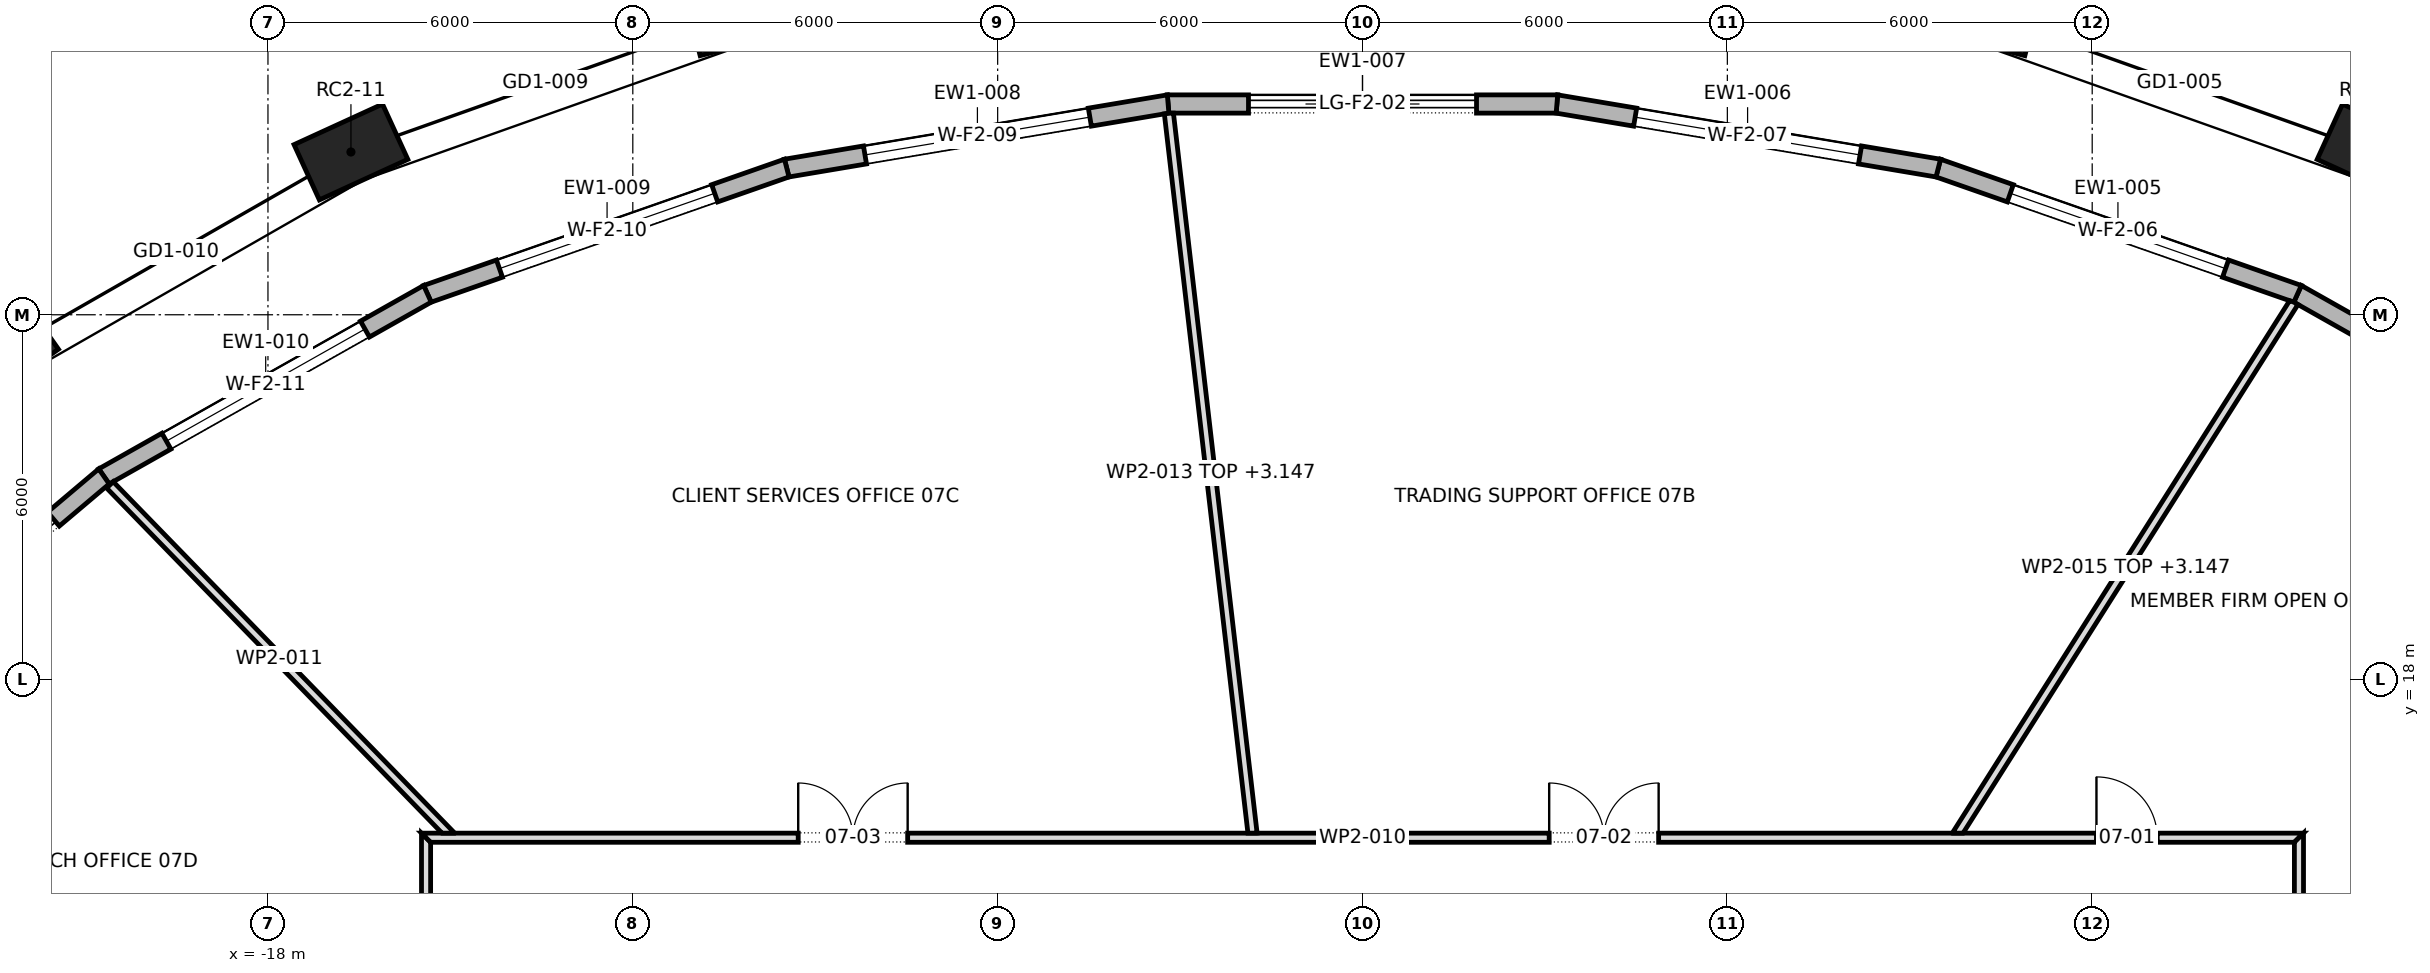
"""IFC4 building model, lengths in metres.
Left out: names, types, materials, properties, quantities, classifications, styles, units other than length and angle.
Written with IfcOpenShell. Run it as: python <this file> out.ifc"""

import sys

from ifc_helpers import new_model, si_unit, direction, frame, frame_2d, origin, origin_2d, place, context, subcontext, project, spatial, polyline, rectangle, outline, extrude, element, fill, save


model = new_model("IFC4")
c1 = context("Model", 3, precision=1e-05, world=origin(), true_north=direction((0.0, 1.0)))
c2 = subcontext(c1, "Body", "Model", "MODEL_VIEW")
j1 = project(units=[si_unit("LENGTHUNIT", "METRE"), si_unit("PLANEANGLEUNIT", "RADIAN")], contexts=[c1])
p1 = place(None, origin())
s1 = spatial("IfcSite", under=j1, at=p1, CompositionType="ELEMENT")
p2 = place(p1, origin())
s2 = spatial("IfcBuilding", under=s1, at=p2, CompositionType="ELEMENT")
p3 = place(p2, frame((0.0, 0.0, 104.5)))
s3 = spatial("IfcBuildingStorey", under=s2, at=p3, CompositionType="ELEMENT", Elevation=104.5)
for number, where, z_axis, x_axis in (
    (1, (16.635, 26.677, 0.0), (0.0, 0.0, 1.0), (-0.909, 0.417, 0.0)),
    (2, (10.244, 28.946, 0.0), (0.0, 0.0, 1.0), (-0.968, 0.252, 0.0)),
    (3, (-10.244, 28.946, 0.0), (0.0, 0.0, 1.0), (-0.968, -0.252, 0.0)),
    (4, (-16.635, 26.677, 0.0), (0.0, 0.0, 1.0), (-0.909, -0.417, 0.0)),
    (5, (-22.387, 23.382, 0.0), (0.0, 0.0, 1.0), (-0.818, -0.575, 0.0)),
):
    element("IfcColumn", number, at=place(p3, frame(where, z_axis=z_axis, x_axis=x_axis)), inside=s3, PredefinedType="COLUMN", context=c2, shape_type="SweptSolid", body=[
        extrude(rectangle(XDim=1.6, YDim=1.0, at=origin_2d()), origin(), (0.0, 0.0, 1.0), 4.2),
    ])
p4 = place(p3, frame((20.697, 21.341, 0.0), z_axis=(0.0, 0.0, 1.0), x_axis=(-0.870828448417, 0.491587035455, 0.0)))
e6 = element("IfcWall", 6, at=p4, inside=s3, PredefinedType="STANDARD", context=c2, shape_type="SweptSolid", body=[
    extrude(outline(polyline([(-0.014, -0.15), (6.122, -0.15), (6.095, 0.15), (0.014, 0.15), (-0.014, -0.15)])), origin(), (0.0, 0.0, 1.0), 3.9),
])
p5 = place(p4, frame((1.179, 0.0, 0.6)))
e7 = element("IfcOpeningElement", 7, at=p5, cuts=e6, PredefinedType="OPENING", context=c2, shape_type="SweptSolid", body=[
    extrude(rectangle(XDim=3.75, YDim=2.85, at=frame_2d((1.875, 1.425))), frame((0.0, 0.162, 0.0), z_axis=(0.0, -1.0, 0.0), x_axis=(1.0, 0.0, 0.0)), (0.0, 0.0, 1.0), 0.324),
])
p6 = place(p3, frame((15.377, 24.344, 0.0), z_axis=(0.0, 0.0, 1.0), x_axis=(-0.943866868202, 0.330326104193, 0.0)))
e8 = element("IfcWall", 8, at=p6, inside=s3, PredefinedType="STANDARD", context=c2, shape_type="SweptSolid", body=[
    extrude(outline(polyline([(-0.013, -0.15), (6.273, -0.15), (6.247, 0.15), (0.013, 0.15), (-0.013, -0.15)])), origin(), (0.0, 0.0, 1.0), 3.9),
])
p7 = place(p6, frame((1.255, 0.0, 0.6)))
e9 = element("IfcOpeningElement", 9, at=p7, cuts=e8, PredefinedType="OPENING", context=c2, shape_type="SweptSolid", body=[
    extrude(rectangle(XDim=3.75, YDim=2.85, at=frame_2d((1.875, 1.425))), frame((0.0, 0.162, 0.0), z_axis=(0.0, -1.0, 0.0), x_axis=(1.0, 0.0, 0.0)), (0.0, 0.0, 1.0), 0.324),
])
p8 = place(p3, frame((9.469, 26.412, 0.0), z_axis=(0.0, 0.0, 1.0), x_axis=(-0.986178310488, 0.165687476666, 0.0)))
e10 = element("IfcWall", 10, at=p8, inside=s3, PredefinedType="STANDARD", context=c2, shape_type="SweptSolid", body=[
    extrude(outline(polyline([(-0.013, -0.15), (6.372, -0.15), (6.347, 0.15), (0.013, 0.15), (-0.013, -0.15)])), origin(), (0.0, 0.0, 1.0), 3.9),
])
p9 = place(p8, frame((1.305, 0.0, 0.6)))
e11 = element("IfcOpeningElement", 11, at=p9, cuts=e10, PredefinedType="OPENING", context=c2, shape_type="SweptSolid", body=[
    extrude(rectangle(XDim=3.75, YDim=2.85, at=frame_2d((1.875, 1.425))), frame((0.0, 0.162, 0.0), z_axis=(0.0, -1.0, 0.0), x_axis=(1.0, 0.0, 0.0)), (0.0, 0.0, 1.0), 0.324),
])
p10 = place(p3, frame((3.197, 27.466, 0.0), z_axis=(0.0, 0.0, 1.0), x_axis=(-1.0, 0.0, 0.0)))
e12 = element("IfcWall", 12, at=p10, inside=s3, PredefinedType="STANDARD", context=c2, shape_type="SweptSolid", body=[
    extrude(outline(polyline([(-0.012, -0.15), (6.406, -0.15), (6.382, 0.15), (0.012, 0.15), (-0.012, -0.15)])), origin(), (0.0, 0.0, 1.0), 3.9),
])
p11 = place(p10, frame((1.322, 0.0, 0.0)))
e13 = element("IfcOpeningElement", 13, at=p11, cuts=e12, PredefinedType="OPENING", context=c2, shape_type="SweptSolid", body=[
    extrude(rectangle(XDim=3.75, YDim=3.45, at=frame_2d((1.875, 1.725))), frame((0.0, 0.162, 0.0), z_axis=(0.0, -1.0, 0.0), x_axis=(1.0, 0.0, 0.0)), (0.0, 0.0, 1.0), 0.324),
])
p12 = place(p3, frame((-3.197, 27.466, 0.0), z_axis=(0.0, 0.0, 1.0), x_axis=(-0.986178310488, -0.165687476666, 0.0)))
e14 = element("IfcWall", 14, at=p12, inside=s3, PredefinedType="STANDARD", context=c2, shape_type="SweptSolid", body=[
    extrude(outline(polyline([(-0.012, -0.15), (6.372, -0.15), (6.347, 0.15), (0.012, 0.15), (-0.012, -0.15)])), origin(), (0.0, 0.0, 1.0), 3.9),
])
p13 = place(p12, frame((1.305, 0.0, 0.6)))
e15 = element("IfcOpeningElement", 15, at=p13, cuts=e14, PredefinedType="OPENING", context=c2, shape_type="SweptSolid", body=[
    extrude(rectangle(XDim=3.75, YDim=2.85, at=frame_2d((1.875, 1.425))), frame((0.0, 0.162, 0.0), z_axis=(0.0, -1.0, 0.0), x_axis=(1.0, 0.0, 0.0)), (0.0, 0.0, 1.0), 0.324),
])
p14 = place(p3, frame((-9.469, 26.412, 0.0), z_axis=(0.0, 0.0, 1.0), x_axis=(-0.943866868202, -0.330326104193, 0.0)))
e16 = element("IfcWall", 16, at=p14, inside=s3, PredefinedType="STANDARD", context=c2, shape_type="SweptSolid", body=[
    extrude(outline(polyline([(-0.013, -0.15), (6.273, -0.15), (6.247, 0.15), (0.013, 0.15), (-0.013, -0.15)])), origin(), (0.0, 0.0, 1.0), 3.9),
])
p15 = place(p14, frame((1.255, 0.0, 0.6)))
e17 = element("IfcOpeningElement", 17, at=p15, cuts=e16, PredefinedType="OPENING", context=c2, shape_type="SweptSolid", body=[
    extrude(rectangle(XDim=3.75, YDim=2.85, at=frame_2d((1.875, 1.425))), frame((0.0, 0.162, 0.0), z_axis=(0.0, -1.0, 0.0), x_axis=(1.0, 0.0, 0.0)), (0.0, 0.0, 1.0), 0.324),
])
p16 = place(p3, frame((-15.377, 24.344, 0.0), z_axis=(0.0, 0.0, 1.0), x_axis=(-0.870828448417, -0.491587035455, 0.0)))
e18 = element("IfcWall", 18, at=p16, inside=s3, PredefinedType="STANDARD", context=c2, shape_type="SweptSolid", body=[
    extrude(outline(polyline([(-0.013, -0.15), (6.123, -0.15), (6.094, 0.15), (0.013, 0.15), (-0.013, -0.15)])), origin(), (0.0, 0.0, 1.0), 3.9),
])
p17 = place(p16, frame((1.179, 0.0, 0.6)))
e19 = element("IfcOpeningElement", 19, at=p17, cuts=e18, PredefinedType="OPENING", context=c2, shape_type="SweptSolid", body=[
    extrude(rectangle(XDim=3.75, YDim=2.85, at=frame_2d((1.875, 1.425))), frame((0.0, 0.162, 0.0), z_axis=(0.0, -1.0, 0.0), x_axis=(1.0, 0.0, 0.0)), (0.0, 0.0, 1.0), 0.324),
])
p18 = place(p3, frame((-20.697, 21.341, 0.0), z_axis=(0.0, 0.0, 1.0), x_axis=(-0.763894031266, -0.645341699409, 0.0)))
e20 = element("IfcWall", 20, at=p18, inside=s3, PredefinedType="STANDARD", context=c2, shape_type="SweptSolid", body=[
    extrude(outline(polyline([(-0.014, -0.15), (5.94, -0.15), (5.91, 0.15), (0.014, 0.15), (-0.014, -0.15)])), origin(), (0.0, 0.0, 1.0), 3.9),
])
p19 = place(p18, frame((1.087, 0.0, 0.0)))
e21 = element("IfcOpeningElement", 21, at=p19, cuts=e20, PredefinedType="OPENING", context=c2, shape_type="SweptSolid", body=[
    extrude(rectangle(XDim=3.75, YDim=3.45, at=frame_2d((1.875, 1.725))), frame((0.0, 0.162, 0.0), z_axis=(0.0, -1.0, 0.0), x_axis=(1.0, 0.0, 0.0)), (0.0, 0.0, 1.0), 0.324),
])
p20 = place(p3, frame((-15.4, -15.475, 0.0), z_axis=(0.0, 0.0, 1.0), x_axis=(0.0, 1.0, 0.0)))
e22 = element("IfcWall", 22, at=p20, inside=s3, PredefinedType="PARTITIONING", context=c2, shape_type="SweptSolid", body=[
    extrude(outline(polyline([(0.15, -0.075), (2.066, -0.075), (3.981, -0.075), (5.897, -0.075), (7.812, -0.075), (9.728, -0.075), (11.644, -0.075), (13.56, -0.075), (15.475, -0.075), (17.391, -0.075), (19.306, -0.075), (21.222, -0.075), (23.138, -0.075), (25.053, -0.075), (26.969, -0.075), (28.885, -0.075), (30.8, -0.075), (30.95, 0.075), (29.016, 0.075), (27.081, 0.075), (25.147, 0.075), (23.212, 0.075), (21.278, 0.075), (19.344, 0.075), (17.409, 0.075), (15.475, 0.075), (13.541, 0.075), (11.606, 0.075), (9.672, 0.075), (7.738, 0.075), (5.803, 0.075), (3.869, 0.075), (1.935, 0.075), (0.0, 0.075), (0.15, -0.075)])), origin(), (0.0, 0.0, 1.0), 3.9),
])
p21 = place(p20, frame((24.25, 0.0, 0.0)))
e23 = element("IfcOpeningElement", 23, at=p21, cuts=e22, PredefinedType="OPENING", context=c2, shape_type="SweptSolid", body=[
    extrude(rectangle(XDim=1.8, YDim=2.1, at=frame_2d((0.9, 1.05))), frame((0.0, 0.087, 0.0), z_axis=(0.0, -1.0, 0.0), x_axis=(1.0, 0.0, 0.0)), (0.0, 0.0, 1.0), 0.174),
])
p22 = place(p20, frame((6.735, 0.0, 0.0)))
e24 = element("IfcOpeningElement", 24, at=p22, cuts=e22, PredefinedType="OPENING", context=c2, shape_type="SweptSolid", body=[
    extrude(rectangle(XDim=1.0, YDim=2.1, at=frame_2d((0.5, 1.05))), frame((0.0, 0.087, 0.0), z_axis=(0.0, -1.0, 0.0), x_axis=(1.0, 0.0, 0.0)), (0.0, 0.0, 1.0), 0.174),
])
p23 = place(p20, frame((12.5, 0.0, 0.0)))
e25 = element("IfcOpeningElement", 25, at=p23, cuts=e22, PredefinedType="OPENING", context=c2, shape_type="SweptSolid", body=[
    extrude(rectangle(XDim=1.0, YDim=2.1, at=frame_2d((0.5, 1.05))), frame((0.0, 0.087, 0.0), z_axis=(0.0, -1.0, 0.0), x_axis=(1.0, 0.0, 0.0)), (0.0, 0.0, 1.0), 0.174),
])
p24 = place(p20, frame((17.375, 0.0, 0.0)))
e26 = element("IfcOpeningElement", 26, at=p24, cuts=e22, PredefinedType="OPENING", context=c2, shape_type="SweptSolid", body=[
    extrude(rectangle(XDim=1.0, YDim=2.1, at=frame_2d((0.5, 1.05))), frame((0.0, 0.087, 0.0), z_axis=(0.0, -1.0, 0.0), x_axis=(1.0, 0.0, 0.0)), (0.0, 0.0, 1.0), 0.174),
])
p25 = place(p3, frame((-15.475, 15.4, 0.0), z_axis=(0.0, 0.0, 1.0), x_axis=(1.0, 0.0, 0.0)))
e27 = element("IfcWall", 27, at=p25, inside=s3, PredefinedType="PARTITIONING", context=c2, shape_type="SweptSolid", body=[
    extrude(outline(polyline([(0.15, -0.075), (2.066, -0.075), (3.981, -0.075), (5.897, -0.075), (7.812, -0.075), (9.728, -0.075), (11.644, -0.075), (13.56, -0.075), (15.475, -0.075), (17.391, -0.075), (19.306, -0.075), (21.222, -0.075), (23.138, -0.075), (25.053, -0.075), (26.969, -0.075), (28.885, -0.075), (30.8, -0.075), (30.95, 0.075), (29.016, 0.075), (27.081, 0.075), (25.147, 0.075), (23.212, 0.075), (21.278, 0.075), (19.344, 0.075), (17.409, 0.075), (15.475, 0.075), (13.541, 0.075), (11.606, 0.075), (9.672, 0.075), (7.738, 0.075), (5.803, 0.075), (3.869, 0.075), (1.935, 0.075), (0.0, 0.075), (0.15, -0.075)])), origin(), (0.0, 0.0, 1.0), 3.9),
])
p26 = place(p25, frame((27.545, 0.0, 0.0)))
e28 = element("IfcOpeningElement", 28, at=p26, cuts=e27, PredefinedType="OPENING", context=c2, shape_type="SweptSolid", body=[
    extrude(rectangle(XDim=1.0, YDim=2.1, at=frame_2d((0.5, 1.05))), frame((0.0, 0.087, 0.0), z_axis=(0.0, -1.0, 0.0), x_axis=(1.0, 0.0, 0.0)), (0.0, 0.0, 1.0), 0.174),
])
p27 = place(p25, frame((18.545, 0.0, 0.0)))
e29 = element("IfcOpeningElement", 29, at=p27, cuts=e27, PredefinedType="OPENING", context=c2, shape_type="SweptSolid", body=[
    extrude(rectangle(XDim=1.8, YDim=2.1, at=frame_2d((0.9, 1.05))), frame((0.0, 0.087, 0.0), z_axis=(0.0, -1.0, 0.0), x_axis=(1.0, 0.0, 0.0)), (0.0, 0.0, 1.0), 0.174),
])
p28 = place(p25, frame((6.195, 0.0, 0.0)))
e30 = element("IfcOpeningElement", 30, at=p28, cuts=e27, PredefinedType="OPENING", context=c2, shape_type="SweptSolid", body=[
    extrude(rectangle(XDim=1.8, YDim=2.1, at=frame_2d((0.9, 1.05))), frame((0.0, 0.087, 0.0), z_axis=(0.0, -1.0, 0.0), x_axis=(1.0, 0.0, 0.0)), (0.0, 0.0, 1.0), 0.174),
])
p29 = place(p3, frame((-14.982, 15.423, 0.0), z_axis=(0.0, 0.0, 1.0), x_axis=(-0.696915710248, 0.717153046992, 0.0)))
e31 = element("IfcWall", 31, at=p29, inside=s3, PredefinedType="PARTITIONING", context=c2, shape_type="SweptSolid", body=[
    extrude(outline(polyline([(8.059, 0.075), (6.08, 0.075), (4.102, 0.075), (2.124, 0.075), (0.146, 0.075), (0.0, -0.075), (0.0, -0.075), (1.612, -0.075), (3.223, -0.075), (4.835, -0.075), (6.447, -0.075), (8.059, -0.075), (8.059, 0.075)])), origin(), (0.0, 0.0, 1.0), 3.9),
])
p30 = place(p3, frame((-1.808, 15.467, 0.0), z_axis=(0.0, 0.0, 1.0), x_axis=(-0.115425226741, 0.993316171736, 0.0)))
e32 = element("IfcWall", 32, at=p30, inside=s3, PredefinedType="PARTITIONING", context=c2, shape_type="SweptSolid", body=[
    extrude(outline(polyline([(0.0, -0.075), (1.987, -0.075), (3.973, -0.075), (5.96, -0.075), (7.947, -0.075), (9.934, -0.075), (11.92, -0.075), (11.925, -0.035), (11.925, 0.075), (9.94, 0.075), (7.956, 0.075), (5.971, 0.075), (3.987, 0.075), (2.002, 0.075), (0.017, 0.075), (0.0, -0.073), (0.0, -0.075)])), origin(), (0.0, 0.0, 1.0), 3.147),
])
p31 = place(p3, frame((9.762, 15.435, 0.0), z_axis=(0.0, 0.0, 1.0), x_axis=(0.535189090909, 0.844732287161, 0.0)))
e33 = element("IfcWall", 33, at=p31, inside=s3, PredefinedType="PARTITIONING", context=c2, shape_type="SweptSolid", body=[
    extrude(outline(polyline([(10.386, -0.075), (10.386, -0.069), (10.382, 0.004), (10.365, 0.075), (8.638, 0.075), (6.91, 0.075), (5.183, 0.075), (3.455, 0.075), (1.728, 0.075), (0.0, 0.075), (0.0, 0.075), (0.095, -0.075), (1.81, -0.075), (3.525, -0.075), (5.24, -0.075), (6.955, -0.075), (8.671, -0.075), (10.386, -0.075)])), origin(), (0.0, 0.0, 1.0), 3.147),
])
p32 = place(p3, frame((15.4, 2.88, 0.0), z_axis=(0.0, 0.0, 1.0), x_axis=(0.0, 1.0, 0.0)))
e34 = element("IfcWall", 34, at=p32, inside=s3, PredefinedType="PARTITIONING", context=c2, shape_type="SweptSolid", body=[
    extrude(outline(polyline([(0.0, -0.075), (1.799, -0.075), (3.599, -0.075), (5.398, -0.075), (7.197, -0.075), (8.996, -0.075), (10.796, -0.075), (12.595, -0.075), (12.445, 0.075), (10.667, 0.075), (8.889, 0.075), (7.112, 0.075), (5.333, 0.075), (3.556, 0.075), (1.778, 0.075), (0.0, 0.075), (0.0, -0.075)])), origin(), (0.0, 0.0, 1.0), 3.9),
])
p33 = place(p32, frame((3.4, 0.0, 0.0)))
e35 = element("IfcOpeningElement", 35, at=p33, cuts=e34, PredefinedType="OPENING", context=c2, shape_type="SweptSolid", body=[
    extrude(rectangle(XDim=1.0, YDim=2.1, at=frame_2d((0.5, 1.05))), frame((0.0, 0.087, 0.0), z_axis=(0.0, -1.0, 0.0), x_axis=(1.0, 0.0, 0.0)), (0.0, 0.0, 1.0), 0.174),
])
p34 = place(p3, frame((15.433, 10.702, 0.0), z_axis=(0.0, 0.0, 1.0), x_axis=(0.82202509952, 0.569451258458, 0.0)))
e36 = element("IfcWall", 36, at=p34, inside=s3, PredefinedType="PARTITIONING", context=c2, shape_type="SweptSolid", body=[
    extrude(outline(polyline([(0.0, -0.075), (1.635, -0.075), (3.269, -0.075), (4.904, -0.075), (6.538, -0.075), (6.54, -0.072), (6.544, -0.075), (8.291, -0.075), (10.038, -0.075), (11.785, -0.075), (11.785, -0.071), (11.78, 0.003), (11.761, 0.075), (9.818, 0.075), (7.875, 0.075), (5.932, 0.075), (3.989, 0.075), (2.046, 0.075), (0.104, 0.075), (0.0, -0.074), (0.0, -0.075)])), origin(), (0.0, 0.0, 1.0), 3.13),
])
p35 = place(p7, origin())
e37 = element("IfcWindow", 37, at=p35, inside=s3, PartitioningType="TRIPLE_PANEL_VERTICAL", PredefinedType="WINDOW", context=c2, shape_type="SweptSolid", body=[
    extrude(rectangle(XDim=3.75, YDim=2.85, at=frame_2d((1.875, 1.425))), frame((0.0, 0.03, 0.0), z_axis=(0.0, -1.0, 0.0), x_axis=(1.0, 0.0, 0.0)), (0.0, 0.0, 1.0), 0.06),
])
fill(e9, e37)
p36 = place(p9, origin())
e38 = element("IfcWindow", 38, at=p36, inside=s3, PartitioningType="TRIPLE_PANEL_VERTICAL", PredefinedType="WINDOW", context=c2, shape_type="SweptSolid", body=[
    extrude(rectangle(XDim=3.75, YDim=2.85, at=frame_2d((1.875, 1.425))), frame((0.0, 0.03, 0.0), z_axis=(0.0, -1.0, 0.0), x_axis=(1.0, 0.0, 0.0)), (0.0, 0.0, 1.0), 0.06),
])
fill(e11, e38)
p37 = place(p11, origin())
e39 = element("IfcDoor", 39, at=p37, inside=s3, OperationType="DOUBLE_DOOR_SLIDING", PredefinedType="DOOR", context=c2, shape_type="SweptSolid", body=[
    extrude(rectangle(XDim=3.75, YDim=3.45, at=frame_2d((1.875, 1.725))), frame((0.0, 0.025, 0.0), z_axis=(0.0, -1.0, 0.0), x_axis=(1.0, 0.0, 0.0)), (0.0, 0.0, 1.0), 0.05),
])
fill(e13, e39)
p38 = place(p13, origin())
e40 = element("IfcWindow", 40, at=p38, inside=s3, PartitioningType="TRIPLE_PANEL_VERTICAL", PredefinedType="WINDOW", context=c2, shape_type="SweptSolid", body=[
    extrude(rectangle(XDim=3.75, YDim=2.85, at=frame_2d((1.875, 1.425))), frame((0.0, 0.03, 0.0), z_axis=(0.0, -1.0, 0.0), x_axis=(1.0, 0.0, 0.0)), (0.0, 0.0, 1.0), 0.06),
])
fill(e15, e40)
p39 = place(p15, origin())
e41 = element("IfcWindow", 41, at=p39, inside=s3, PartitioningType="TRIPLE_PANEL_VERTICAL", PredefinedType="WINDOW", context=c2, shape_type="SweptSolid", body=[
    extrude(rectangle(XDim=3.75, YDim=2.85, at=frame_2d((1.875, 1.425))), frame((0.0, 0.03, 0.0), z_axis=(0.0, -1.0, 0.0), x_axis=(1.0, 0.0, 0.0)), (0.0, 0.0, 1.0), 0.06),
])
fill(e17, e41)
p40 = place(p17, origin())
e42 = element("IfcWindow", 42, at=p40, inside=s3, PartitioningType="TRIPLE_PANEL_VERTICAL", PredefinedType="WINDOW", context=c2, shape_type="SweptSolid", body=[
    extrude(rectangle(XDim=3.75, YDim=2.85, at=frame_2d((1.875, 1.425))), frame((0.0, 0.03, 0.0), z_axis=(0.0, -1.0, 0.0), x_axis=(1.0, 0.0, 0.0)), (0.0, 0.0, 1.0), 0.06),
])
fill(e19, e42)
p41 = place(p19, origin())
e43 = element("IfcDoor", 43, at=p41, inside=s3, OperationType="DOUBLE_DOOR_SLIDING", PredefinedType="DOOR", context=c2, shape_type="SweptSolid", body=[
    extrude(rectangle(XDim=3.75, YDim=3.45, at=frame_2d((1.875, 1.725))), frame((0.0, 0.025, 0.0), z_axis=(0.0, -1.0, 0.0), x_axis=(1.0, 0.0, 0.0)), (0.0, 0.0, 1.0), 0.05),
])
fill(e21, e43)
p42 = place(p26, origin())
e44 = element("IfcDoor", 44, at=p42, inside=s3, OperationType="SINGLE_SWING_RIGHT", PredefinedType="DOOR", context=c2, shape_type="SweptSolid", body=[
    extrude(rectangle(XDim=1.0, YDim=2.1, at=frame_2d((0.5, 1.05))), frame((0.0, 0.025, 0.0), z_axis=(0.0, -1.0, 0.0), x_axis=(1.0, 0.0, 0.0)), (0.0, 0.0, 1.0), 0.05),
])
fill(e28, e44)
p43 = place(p27, origin())
e45 = element("IfcDoor", 45, at=p43, inside=s3, OperationType="DOUBLE_DOOR_SINGLE_SWING", PredefinedType="DOOR", context=c2, shape_type="SweptSolid", body=[
    extrude(rectangle(XDim=1.8, YDim=2.1, at=frame_2d((0.9, 1.05))), frame((0.0, 0.025, 0.0), z_axis=(0.0, -1.0, 0.0), x_axis=(1.0, 0.0, 0.0)), (0.0, 0.0, 1.0), 0.05),
])
fill(e29, e45)
p44 = place(p28, origin())
e46 = element("IfcDoor", 46, at=p44, inside=s3, OperationType="DOUBLE_DOOR_SINGLE_SWING", PredefinedType="DOOR", context=c2, shape_type="SweptSolid", body=[
    extrude(rectangle(XDim=1.8, YDim=2.1, at=frame_2d((0.9, 1.05))), frame((0.0, 0.025, 0.0), z_axis=(0.0, -1.0, 0.0), x_axis=(1.0, 0.0, 0.0)), (0.0, 0.0, 1.0), 0.05),
])
fill(e30, e46)
save(model, sys.argv[1])
